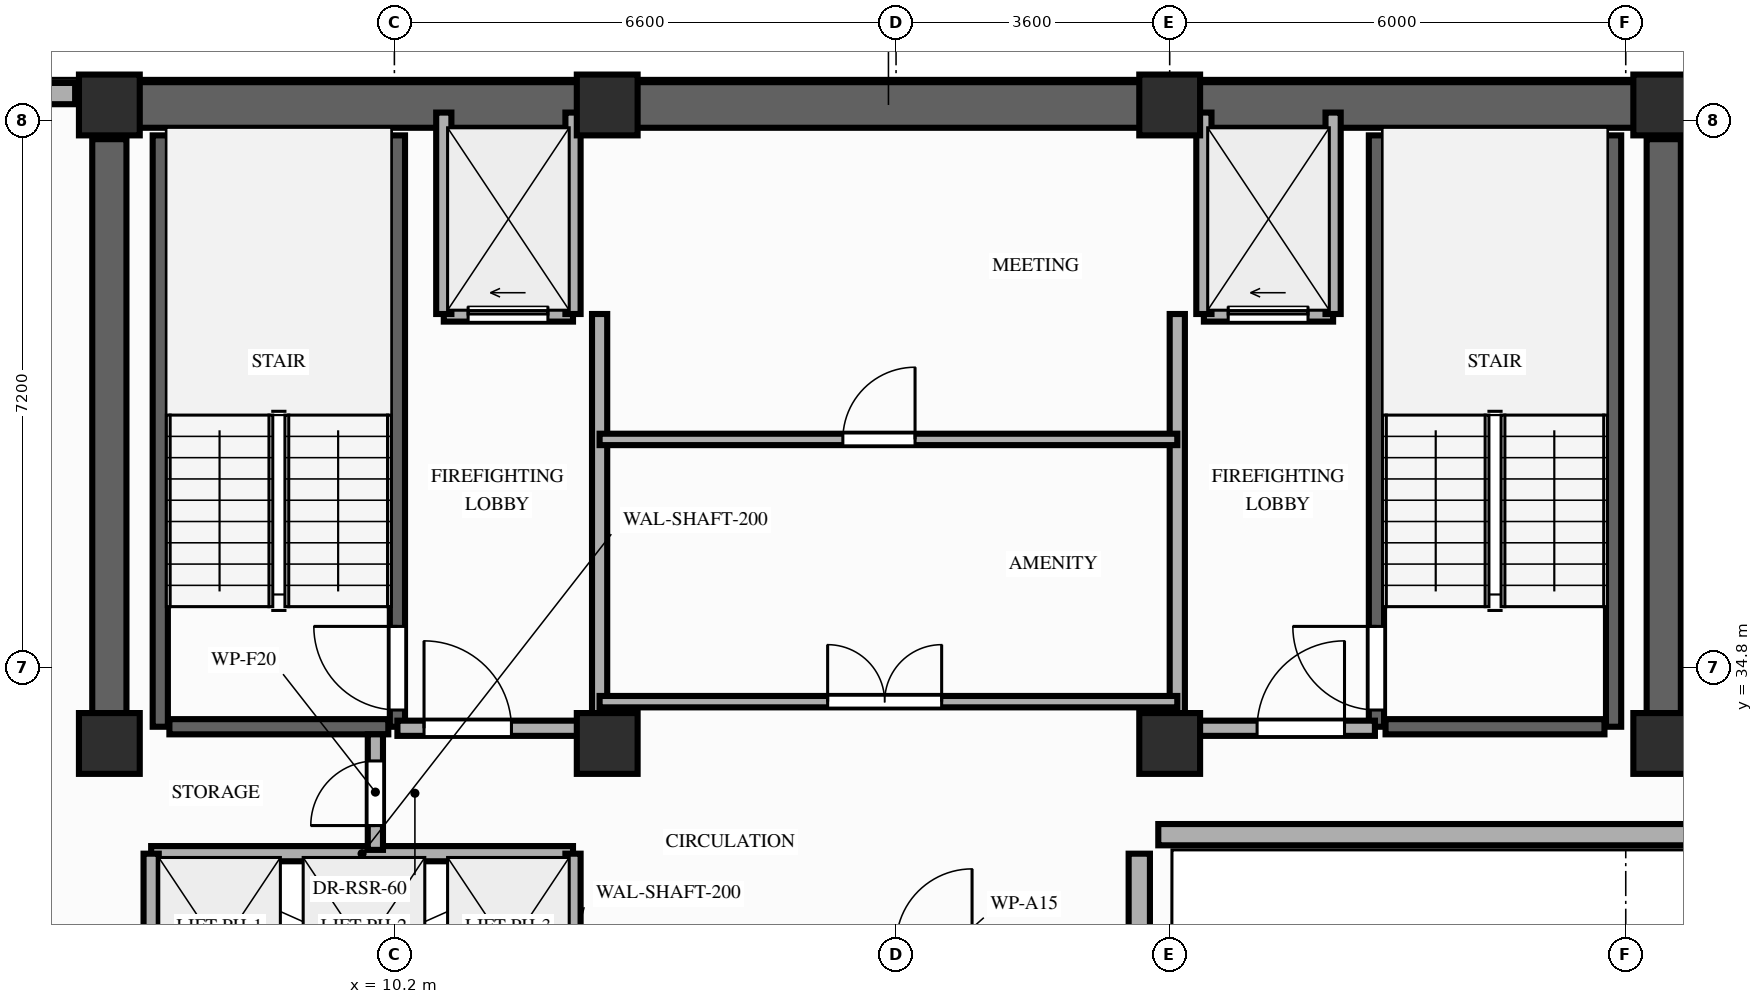
"""IFC4 building model, lengths in metres.
Left out: names, types, materials, properties, quantities, classifications, styles, units other than length and angle.
Written with IfcOpenShell. Run it as: python <this file> out.ifc"""

import sys

from ifc_helpers import new_model, si_unit, direction, frame, frame_2d, origin, origin_2d, place, context, subcontext, project, spatial, rectangle, extrude, element, fill, save


model = new_model("IFC4")
c1 = context("Model", 3, precision=1e-05, world=origin(), true_north=direction((0.0, 1.0)))
c2 = subcontext(c1, "Body", "Model", "MODEL_VIEW")
j1 = project(units=[si_unit("LENGTHUNIT", "METRE"), si_unit("PLANEANGLEUNIT", "RADIAN")], contexts=[c1])
p1 = place(None, origin())
s1 = spatial("IfcSite", under=j1, at=p1, CompositionType="ELEMENT")
p2 = place(p1, origin())
s2 = spatial("IfcBuilding", under=s1, at=p2, CompositionType="ELEMENT")
p3 = place(p2, frame((0.0, 0.0, 204.8)))
s3 = spatial("IfcBuildingStorey", under=s2, at=p3, CompositionType="ELEMENT", Elevation=204.8)
for number, where, z_axis, x_axis in (
    (1, (6.45, 33.8, 0.0), (0.0, 0.0, 1.0), (1.0, 0.0, 0.0)),
    (2, (13.0, 33.8, 0.0), (0.0, 0.0, 1.0), (1.0, 0.0, 0.0)),
    (3, (20.4, 33.8, 0.0), (0.0, 0.0, 1.0), (1.0, 0.0, 0.0)),
    (4, (26.9, 33.8, 0.0), (0.0, 0.0, 1.0), (1.0, 0.0, 0.0)),
    (5, (6.45, 42.2, 0.0), (0.0, 0.0, 1.0), (1.0, 0.0, 0.0)),
    (6, (13.0, 42.2, 0.0), (0.0, 0.0, 1.0), (1.0, 0.0, 0.0)),
    (7, (20.4, 42.2, 0.0), (0.0, 0.0, 1.0), (1.0, 0.0, 0.0)),
    (8, (26.9, 42.2, 0.0), (0.0, 0.0, 1.0), (1.0, 0.0, 0.0)),
):
    element("IfcColumn", number, at=place(p3, frame(where, z_axis=z_axis, x_axis=x_axis)), inside=s3, PredefinedType="COLUMN", context=c2, shape_type="SweptSolid", body=[
        extrude(rectangle(XDim=0.8, YDim=0.8, at=origin_2d()), origin(), (0.0, 0.0, 1.0), 3.2),
    ])
p4 = place(p3, frame((20.0, 8.8, 0.0), z_axis=(0.0, 0.0, 1.0), x_axis=(0.0, 1.0, 0.0)))
e9 = element("IfcWall", 9, at=p4, inside=s3, PredefinedType="STANDARD", context=c2, shape_type="SweptSolid", body=[
    extrude(rectangle(XDim=23.55, YDim=0.28, at=frame_2d((11.775, 0.0))), origin(), (0.0, 0.0, 1.0), 2.51),
])
p5 = place(p4, frame((5.12, 0.0, 0.85)))
e10 = element("IfcOpeningElement", 10, at=p5, cuts=e9, PredefinedType="OPENING", context=c2, shape_type="SweptSolid", body=[
    extrude(rectangle(XDim=2.1, YDim=1.41, at=frame_2d((1.05, 0.705))), frame((0.0, 0.15, 0.0), z_axis=(0.0, -1.0, 0.0), x_axis=(1.0, 0.0, 0.0)), (0.0, 0.0, 1.0), 0.3),
])
p6 = place(p4, frame((10.85, 0.0, 0.85)))
e11 = element("IfcOpeningElement", 11, at=p6, cuts=e9, PredefinedType="OPENING", context=c2, shape_type="SweptSolid", body=[
    extrude(rectangle(XDim=2.1, YDim=1.41, at=frame_2d((1.05, 0.705))), frame((0.0, 0.15, 0.0), z_axis=(0.0, -1.0, 0.0), x_axis=(1.0, 0.0, 0.0)), (0.0, 0.0, 1.0), 0.3),
])
p7 = place(p3, frame((6.0, 42.35, 0.0), z_axis=(0.0, 0.0, 1.0), x_axis=(-1.0, 0.0, 0.0)))
e12 = element("IfcWall", 12, at=p7, inside=s3, PredefinedType="STANDARD", context=c2, shape_type="SweptSolid", body=[
    extrude(rectangle(XDim=2.0, YDim=0.28, at=frame_2d((1.0, 0.0))), origin(), (0.0, 0.0, 1.0), 3.02),
])
p8 = place(p3, frame((20.25, 32.6, 0.0), z_axis=(0.0, 0.0, 1.0), x_axis=(1.0, 0.0, 0.0)))
e13 = element("IfcWall", 13, at=p8, inside=s3, PredefinedType="STANDARD", context=c2, shape_type="SweptSolid", body=[
    extrude(rectangle(XDim=7.35, YDim=0.28, at=frame_2d((3.675, 0.0))), origin(), (0.0, 0.0, 1.0), 2.51),
])
p9 = place(p3, frame((6.45, 42.2, 0.0), z_axis=(0.0, 0.0, 1.0), x_axis=(1.0, 0.0, 0.0)))
e14 = element("IfcWall", 14, at=p9, inside=s3, PredefinedType="SHEAR", context=c2, shape_type="SweptSolid", body=[
    extrude(rectangle(XDim=20.45, YDim=0.6, at=frame_2d((10.225, 0.0))), origin(), (0.0, 0.0, 1.0), 3.02),
])
for number, where, z_axis, x_axis in (
    (15, (6.45, 33.8, 0.0), (0.0, 0.0, 1.0), (0.0, 1.0, 0.0)),
    (16, (26.9, 33.8, 0.0), (0.0, 0.0, 1.0), (0.0, 1.0, 0.0)),
):
    element("IfcWall", number, at=place(p3, frame(where, z_axis=z_axis, x_axis=x_axis)), inside=s3, PredefinedType="SHEAR", context=c2, shape_type="SweptSolid", body=[
        extrude(rectangle(XDim=7.95, YDim=0.45, at=frame_2d((3.975, 0.0))), origin(), (0.0, 0.0, 1.0), 3.02),
    ])
p10 = place(p3, frame((7.12, 34.02, 0.0), z_axis=(0.0, 0.0, 1.0), x_axis=(0.0, 1.0, 0.0)))
e17 = element("IfcWall", 17, at=p10, inside=s3, PredefinedType="SHEAR", context=c2, shape_type="SweptSolid", body=[
    extrude(rectangle(XDim=7.78, YDim=0.2, at=frame_2d((3.89, 0.0))), origin(), (0.0, 0.0, 1.0), 3.02),
])
p11 = place(p3, frame((10.24, 34.02, 0.0), z_axis=(0.0, 0.0, 1.0), x_axis=(0.0, 1.0, 0.0)))
e18 = element("IfcWall", 18, at=p11, inside=s3, PredefinedType="SHEAR", context=c2, shape_type="SweptSolid", body=[
    extrude(rectangle(XDim=7.78, YDim=0.2, at=frame_2d((3.89, 0.0))), origin(), (0.0, 0.0, 1.0), 3.02),
])
p12 = place(p11, frame((0.22, 0.0, 0.0)))
e19 = element("IfcOpeningElement", 19, at=p12, cuts=e18, PredefinedType="OPENING", context=c2, shape_type="SweptSolid", body=[
    extrude(rectangle(XDim=1.1, YDim=2.15, at=frame_2d((0.55, 1.075))), frame((0.0, 0.11, 0.0), z_axis=(0.0, -1.0, 0.0), x_axis=(1.0, 0.0, 0.0)), (0.0, 0.0, 1.0), 0.22),
])
p13 = place(p3, frame((7.24, 34.02, 0.0), z_axis=(0.0, 0.0, 1.0), x_axis=(1.0, 0.0, 0.0)))
e20 = element("IfcWall", 20, at=p13, inside=s3, PredefinedType="SHEAR", context=c2, shape_type="SweptSolid", body=[
    extrude(rectangle(XDim=2.88, YDim=0.2, at=frame_2d((1.44, 0.0))), origin(), (0.0, 0.0, 1.0), 3.02),
])
p14 = place(p3, frame((23.12, 34.02, 0.0), z_axis=(0.0, 0.0, 1.0), x_axis=(0.0, 1.0, 0.0)))
e21 = element("IfcWall", 21, at=p14, inside=s3, PredefinedType="SHEAR", context=c2, shape_type="SweptSolid", body=[
    extrude(rectangle(XDim=7.78, YDim=0.2, at=frame_2d((3.89, 0.0))), origin(), (0.0, 0.0, 1.0), 3.02),
])
p15 = place(p14, frame((0.22, 0.0, 0.0)))
e22 = element("IfcOpeningElement", 22, at=p15, cuts=e21, PredefinedType="OPENING", context=c2, shape_type="SweptSolid", body=[
    extrude(rectangle(XDim=1.1, YDim=2.15, at=frame_2d((0.55, 1.075))), frame((0.0, 0.11, 0.0), z_axis=(0.0, -1.0, 0.0), x_axis=(1.0, 0.0, 0.0)), (0.0, 0.0, 1.0), 0.22),
])
p16 = place(p3, frame((26.24, 34.02, 0.0), z_axis=(0.0, 0.0, 1.0), x_axis=(0.0, 1.0, 0.0)))
e23 = element("IfcWall", 23, at=p16, inside=s3, PredefinedType="SHEAR", context=c2, shape_type="SweptSolid", body=[
    extrude(rectangle(XDim=7.78, YDim=0.2, at=frame_2d((3.89, 0.0))), origin(), (0.0, 0.0, 1.0), 3.02),
])
p17 = place(p3, frame((23.24, 34.02, 0.0), z_axis=(0.0, 0.0, 1.0), x_axis=(1.0, 0.0, 0.0)))
e24 = element("IfcWall", 24, at=p17, inside=s3, PredefinedType="SHEAR", context=c2, shape_type="SweptSolid", body=[
    extrude(rectangle(XDim=2.88, YDim=0.2, at=frame_2d((1.44, 0.0))), origin(), (0.0, 0.0, 1.0), 3.02),
])
p18 = place(p3, frame((7.0, 32.35, 0.0), z_axis=(0.0, 0.0, 1.0), x_axis=(1.0, 0.0, 0.0)))
e25 = element("IfcWall", 25, at=p18, inside=s3, PredefinedType="MOVABLE", context=c2, shape_type="SweptSolid", body=[
    extrude(rectangle(XDim=5.55, YDim=0.2, at=frame_2d((2.775, 0.0))), origin(), (0.0, 0.0, 1.0), 3.02),
])
for number, where, z_axis, x_axis in (
    (26, (7.0, 29.85, 0.0), (0.0, 0.0, 1.0), (0.0, 1.0, 0.0)),
    (27, (12.55, 29.85, 0.0), (0.0, 0.0, 1.0), (0.0, 1.0, 0.0)),
):
    element("IfcWall", number, at=place(p3, frame(where, z_axis=z_axis, x_axis=x_axis)), inside=s3, PredefinedType="MOVABLE", context=c2, shape_type="SweptSolid", body=[
        extrude(rectangle(XDim=2.5, YDim=0.2, at=frame_2d((1.25, 0.0))), origin(), (0.0, 0.0, 1.0), 3.02),
    ])
p19 = place(p3, frame((10.85, 39.45, 0.0), z_axis=(0.0, 0.0, 1.0), x_axis=(1.0, 0.0, 0.0)))
e28 = element("IfcWall", 28, at=p19, inside=s3, PredefinedType="MOVABLE", context=c2, shape_type="SweptSolid", body=[
    extrude(rectangle(XDim=1.7, YDim=0.2, at=frame_2d((0.85, 0.0))), origin(), (0.0, 0.0, 1.0), 3.02),
])
p20 = place(p19, frame((0.32, 0.0, 0.0)))
e29 = element("IfcOpeningElement", 29, at=p20, cuts=e28, PredefinedType="OPENING", context=c2, shape_type="SweptSolid", body=[
    extrude(rectangle(XDim=1.05, YDim=2.15, at=frame_2d((0.525, 1.075))), frame((0.0, 0.11, 0.0), z_axis=(0.0, -1.0, 0.0), x_axis=(1.0, 0.0, 0.0)), (0.0, 0.0, 1.0), 0.22),
])
p21 = place(p3, frame((20.85, 39.45, 0.0), z_axis=(0.0, 0.0, 1.0), x_axis=(1.0, 0.0, 0.0)))
e30 = element("IfcWall", 30, at=p21, inside=s3, PredefinedType="MOVABLE", context=c2, shape_type="SweptSolid", body=[
    extrude(rectangle(XDim=1.7, YDim=0.2, at=frame_2d((0.85, 0.0))), origin(), (0.0, 0.0, 1.0), 3.02),
])
p22 = place(p21, frame((0.32, 0.0, 0.0)))
e31 = element("IfcOpeningElement", 31, at=p22, cuts=e30, PredefinedType="OPENING", context=c2, shape_type="SweptSolid", body=[
    extrude(rectangle(XDim=1.05, YDim=2.15, at=frame_2d((0.525, 1.075))), frame((0.0, 0.11, 0.0), z_axis=(0.0, -1.0, 0.0), x_axis=(1.0, 0.0, 0.0)), (0.0, 0.0, 1.0), 0.22),
])
for number, where, z_axis, x_axis in (
    (32, (10.85, 39.45, 0.0), (0.0, 0.0, 1.0), (0.0, 1.0, 0.0)),
    (33, (12.55, 39.45, 0.0), (0.0, 0.0, 1.0), (0.0, 1.0, 0.0)),
):
    element("IfcWall", number, at=place(p3, frame(where, z_axis=z_axis, x_axis=x_axis)), inside=s3, PredefinedType="MOVABLE", context=c2, shape_type="SweptSolid", body=[
        extrude(rectangle(XDim=2.65, YDim=0.2, at=frame_2d((1.325, 0.0))), origin(), (0.0, 0.0, 1.0), 2.51),
    ])
p23 = place(p3, frame((12.9, 34.0, 0.0), z_axis=(0.0, 0.0, 1.0), x_axis=(0.0, 1.0, 0.0)))
e34 = element("IfcWall", 34, at=p23, inside=s3, PredefinedType="PARTITIONING", context=c2, shape_type="SweptSolid", body=[
    extrude(rectangle(XDim=5.45, YDim=0.2, at=frame_2d((2.725, 0.0))), origin(), (0.0, 0.0, 1.0), 2.51),
])
p24 = place(p3, frame((10.24, 34.0, 0.0), z_axis=(0.0, 0.0, 1.0), x_axis=(1.0, 0.0, 0.0)))
e35 = element("IfcWall", 35, at=p24, inside=s3, PredefinedType="PARTITIONING", context=c2, shape_type="SweptSolid", body=[
    extrude(rectangle(XDim=2.66, YDim=0.2, at=frame_2d((1.33, 0.0))), origin(), (0.0, 0.0, 1.0), 2.51),
])
p25 = place(p24, frame((0.35, 0.0, 0.0)))
e36 = element("IfcOpeningElement", 36, at=p25, cuts=e35, PredefinedType="OPENING", context=c2, shape_type="SweptSolid", body=[
    extrude(rectangle(XDim=1.15, YDim=2.15, at=frame_2d((0.575, 1.075))), frame((0.0, 0.11, 0.0), z_axis=(0.0, -1.0, 0.0), x_axis=(1.0, 0.0, 0.0)), (0.0, 0.0, 1.0), 0.22),
])
for number, where, z_axis, x_axis in (
    (37, (20.85, 39.45, 0.0), (0.0, 0.0, 1.0), (0.0, 1.0, 0.0)),
    (38, (22.55, 39.45, 0.0), (0.0, 0.0, 1.0), (0.0, 1.0, 0.0)),
):
    element("IfcWall", number, at=place(p3, frame(where, z_axis=z_axis, x_axis=x_axis)), inside=s3, PredefinedType="MOVABLE", context=c2, shape_type="SweptSolid", body=[
        extrude(rectangle(XDim=2.65, YDim=0.2, at=frame_2d((1.325, 0.0))), origin(), (0.0, 0.0, 1.0), 2.51),
    ])
p26 = place(p3, frame((20.5, 34.0, 0.0), z_axis=(0.0, 0.0, 1.0), x_axis=(0.0, 1.0, 0.0)))
e39 = element("IfcWall", 39, at=p26, inside=s3, PredefinedType="PARTITIONING", context=c2, shape_type="SweptSolid", body=[
    extrude(rectangle(XDim=5.45, YDim=0.2, at=frame_2d((2.725, 0.0))), origin(), (0.0, 0.0, 1.0), 2.51),
])
p27 = place(p3, frame((20.5, 34.0, 0.0), z_axis=(0.0, 0.0, 1.0), x_axis=(1.0, 0.0, 0.0)))
e40 = element("IfcWall", 40, at=p27, inside=s3, PredefinedType="PARTITIONING", context=c2, shape_type="SweptSolid", body=[
    extrude(rectangle(XDim=2.6, YDim=0.2, at=frame_2d((1.3, 0.0))), origin(), (0.0, 0.0, 1.0), 2.51),
])
p28 = place(p27, frame((1.05, 0.0, 0.0)))
e41 = element("IfcOpeningElement", 41, at=p28, cuts=e40, PredefinedType="OPENING", context=c2, shape_type="SweptSolid", body=[
    extrude(rectangle(XDim=1.15, YDim=2.15, at=frame_2d((0.575, 1.075))), frame((0.0, 0.11, 0.0), z_axis=(0.0, -1.0, 0.0), x_axis=(1.0, 0.0, 0.0)), (0.0, 0.0, 1.0), 0.22),
])
p29 = place(p3, frame((9.95, 32.4, 0.0), z_axis=(0.0, 0.0, 1.0), x_axis=(0.0, 1.0, 0.0)))
e42 = element("IfcWall", 42, at=p29, inside=s3, PredefinedType="PARTITIONING", context=c2, shape_type="SweptSolid", body=[
    extrude(rectangle(XDim=1.52, YDim=0.2, at=frame_2d((0.76, 0.0))), origin(), (0.0, 0.0, 1.0), 2.51),
])
p30 = place(p29, frame((0.32, 0.0, 0.0)))
e43 = element("IfcOpeningElement", 43, at=p30, cuts=e42, PredefinedType="OPENING", context=c2, shape_type="SweptSolid", body=[
    extrude(rectangle(XDim=0.85, YDim=2.05, at=frame_2d((0.425, 1.025))), frame((0.0, 0.11, 0.0), z_axis=(0.0, -1.0, 0.0), x_axis=(1.0, 0.0, 0.0)), (0.0, 0.0, 1.0), 0.22),
])
p31 = place(p3, frame((12.9, 34.35, 0.0), z_axis=(0.0, 0.0, 1.0), x_axis=(1.0, 0.0, 0.0)))
e44 = element("IfcWall", 44, at=p31, inside=s3, PredefinedType="PARTITIONING", context=c2, shape_type="SweptSolid", body=[
    extrude(rectangle(XDim=7.6, YDim=0.15, at=frame_2d((3.8, 0.0))), origin(), (0.0, 0.0, 1.0), 3.02),
])
p32 = place(p31, frame((3.0, 0.0, 0.0)))
e45 = element("IfcOpeningElement", 45, at=p32, cuts=e44, PredefinedType="OPENING", context=c2, shape_type="SweptSolid", body=[
    extrude(rectangle(XDim=1.5, YDim=2.15, at=frame_2d((0.75, 1.075))), frame((0.0, 0.085, 0.0), z_axis=(0.0, -1.0, 0.0), x_axis=(1.0, 0.0, 0.0)), (0.0, 0.0, 1.0), 0.17),
])
p33 = place(p3, frame((12.9, 37.8, 0.0), z_axis=(0.0, 0.0, 1.0), x_axis=(1.0, 0.0, 0.0)))
e46 = element("IfcWall", 46, at=p33, inside=s3, PredefinedType="PARTITIONING", context=c2, shape_type="SweptSolid", body=[
    extrude(rectangle(XDim=7.6, YDim=0.15, at=frame_2d((3.8, 0.0))), origin(), (0.0, 0.0, 1.0), 3.02),
])
p34 = place(p33, frame((3.2, 0.0, 0.0)))
e47 = element("IfcOpeningElement", 47, at=p34, cuts=e46, PredefinedType="OPENING", context=c2, shape_type="SweptSolid", body=[
    extrude(rectangle(XDim=0.95, YDim=2.15, at=frame_2d((0.475, 1.075))), frame((0.0, 0.085, 0.0), z_axis=(0.0, -1.0, 0.0), x_axis=(1.0, 0.0, 0.0)), (0.0, 0.0, 1.0), 0.17),
])
p35 = place(p12, origin())
e48 = element("IfcDoor", 48, at=p35, inside=s3, OperationType="SINGLE_SWING_RIGHT", PredefinedType="DOOR", context=c2, shape_type="SweptSolid", body=[
    extrude(rectangle(XDim=1.1, YDim=2.15, at=frame_2d((0.55, 1.075))), frame((0.0, 0.025, 0.0), z_axis=(0.0, -1.0, 0.0), x_axis=(1.0, 0.0, 0.0)), (0.0, 0.0, 1.0), 0.05),
])
fill(e19, e48)
p36 = place(p15, origin())
e49 = element("IfcDoor", 49, at=p36, inside=s3, OperationType="SINGLE_SWING_RIGHT", PredefinedType="DOOR", context=c2, shape_type="SweptSolid", body=[
    extrude(rectangle(XDim=1.1, YDim=2.15, at=frame_2d((0.55, 1.075))), frame((0.0, 0.025, 0.0), z_axis=(0.0, -1.0, 0.0), x_axis=(1.0, 0.0, 0.0)), (0.0, 0.0, 1.0), 0.05),
])
fill(e22, e49)
p37 = place(p20, origin())
e50 = element("IfcDoor", 50, at=p37, inside=s3, OperationType="SLIDING_TO_LEFT", PredefinedType="DOOR", context=c2, shape_type="SweptSolid", body=[
    extrude(rectangle(XDim=1.05, YDim=2.15, at=frame_2d((0.525, 1.075))), frame((0.0, 0.025, 0.0), z_axis=(0.0, -1.0, 0.0), x_axis=(1.0, 0.0, 0.0)), (0.0, 0.0, 1.0), 0.05),
])
fill(e29, e50)
p38 = place(p22, origin())
e51 = element("IfcDoor", 51, at=p38, inside=s3, OperationType="SLIDING_TO_LEFT", PredefinedType="DOOR", context=c2, shape_type="SweptSolid", body=[
    extrude(rectangle(XDim=1.05, YDim=2.15, at=frame_2d((0.525, 1.075))), frame((0.0, 0.025, 0.0), z_axis=(0.0, -1.0, 0.0), x_axis=(1.0, 0.0, 0.0)), (0.0, 0.0, 1.0), 0.05),
])
fill(e31, e51)
p39 = place(p25, origin())
e52 = element("IfcDoor", 52, at=p39, inside=s3, OperationType="SINGLE_SWING_LEFT", PredefinedType="DOOR", context=c2, shape_type="SweptSolid", body=[
    extrude(rectangle(XDim=1.15, YDim=2.15, at=frame_2d((0.575, 1.075))), frame((0.0, 0.025, 0.0), z_axis=(0.0, -1.0, 0.0), x_axis=(1.0, 0.0, 0.0)), (0.0, 0.0, 1.0), 0.05),
])
fill(e36, e52)
p40 = place(p28, origin())
e53 = element("IfcDoor", 53, at=p40, inside=s3, OperationType="SINGLE_SWING_RIGHT", PredefinedType="DOOR", context=c2, shape_type="SweptSolid", body=[
    extrude(rectangle(XDim=1.15, YDim=2.15, at=frame_2d((0.575, 1.075))), frame((0.0, 0.025, 0.0), z_axis=(0.0, -1.0, 0.0), x_axis=(1.0, 0.0, 0.0)), (0.0, 0.0, 1.0), 0.05),
])
fill(e41, e53)
p41 = place(p30, origin())
e54 = element("IfcDoor", 54, at=p41, inside=s3, OperationType="SINGLE_SWING_LEFT", PredefinedType="DOOR", context=c2, shape_type="SweptSolid", body=[
    extrude(rectangle(XDim=0.85, YDim=2.05, at=frame_2d((0.425, 1.025))), frame((0.0, 0.025, 0.0), z_axis=(0.0, -1.0, 0.0), x_axis=(1.0, 0.0, 0.0)), (0.0, 0.0, 1.0), 0.05),
])
fill(e43, e54)
p42 = place(p32, origin())
e55 = element("IfcDoor", 55, at=p42, inside=s3, OperationType="DOUBLE_DOOR_SINGLE_SWING", PredefinedType="DOOR", context=c2, shape_type="SweptSolid", body=[
    extrude(rectangle(XDim=1.5, YDim=2.15, at=frame_2d((0.75, 1.075))), frame((0.0, 0.025, 0.0), z_axis=(0.0, -1.0, 0.0), x_axis=(1.0, 0.0, 0.0)), (0.0, 0.0, 1.0), 0.05),
])
fill(e45, e55)
p43 = place(p34, origin())
e56 = element("IfcDoor", 56, at=p43, inside=s3, OperationType="SINGLE_SWING_RIGHT", PredefinedType="DOOR", context=c2, shape_type="SweptSolid", body=[
    extrude(rectangle(XDim=0.95, YDim=2.15, at=frame_2d((0.475, 1.075))), frame((0.0, 0.025, 0.0), z_axis=(0.0, -1.0, 0.0), x_axis=(1.0, 0.0, 0.0)), (0.0, 0.0, 1.0), 0.05),
])
fill(e47, e56)
save(model, sys.argv[1])
